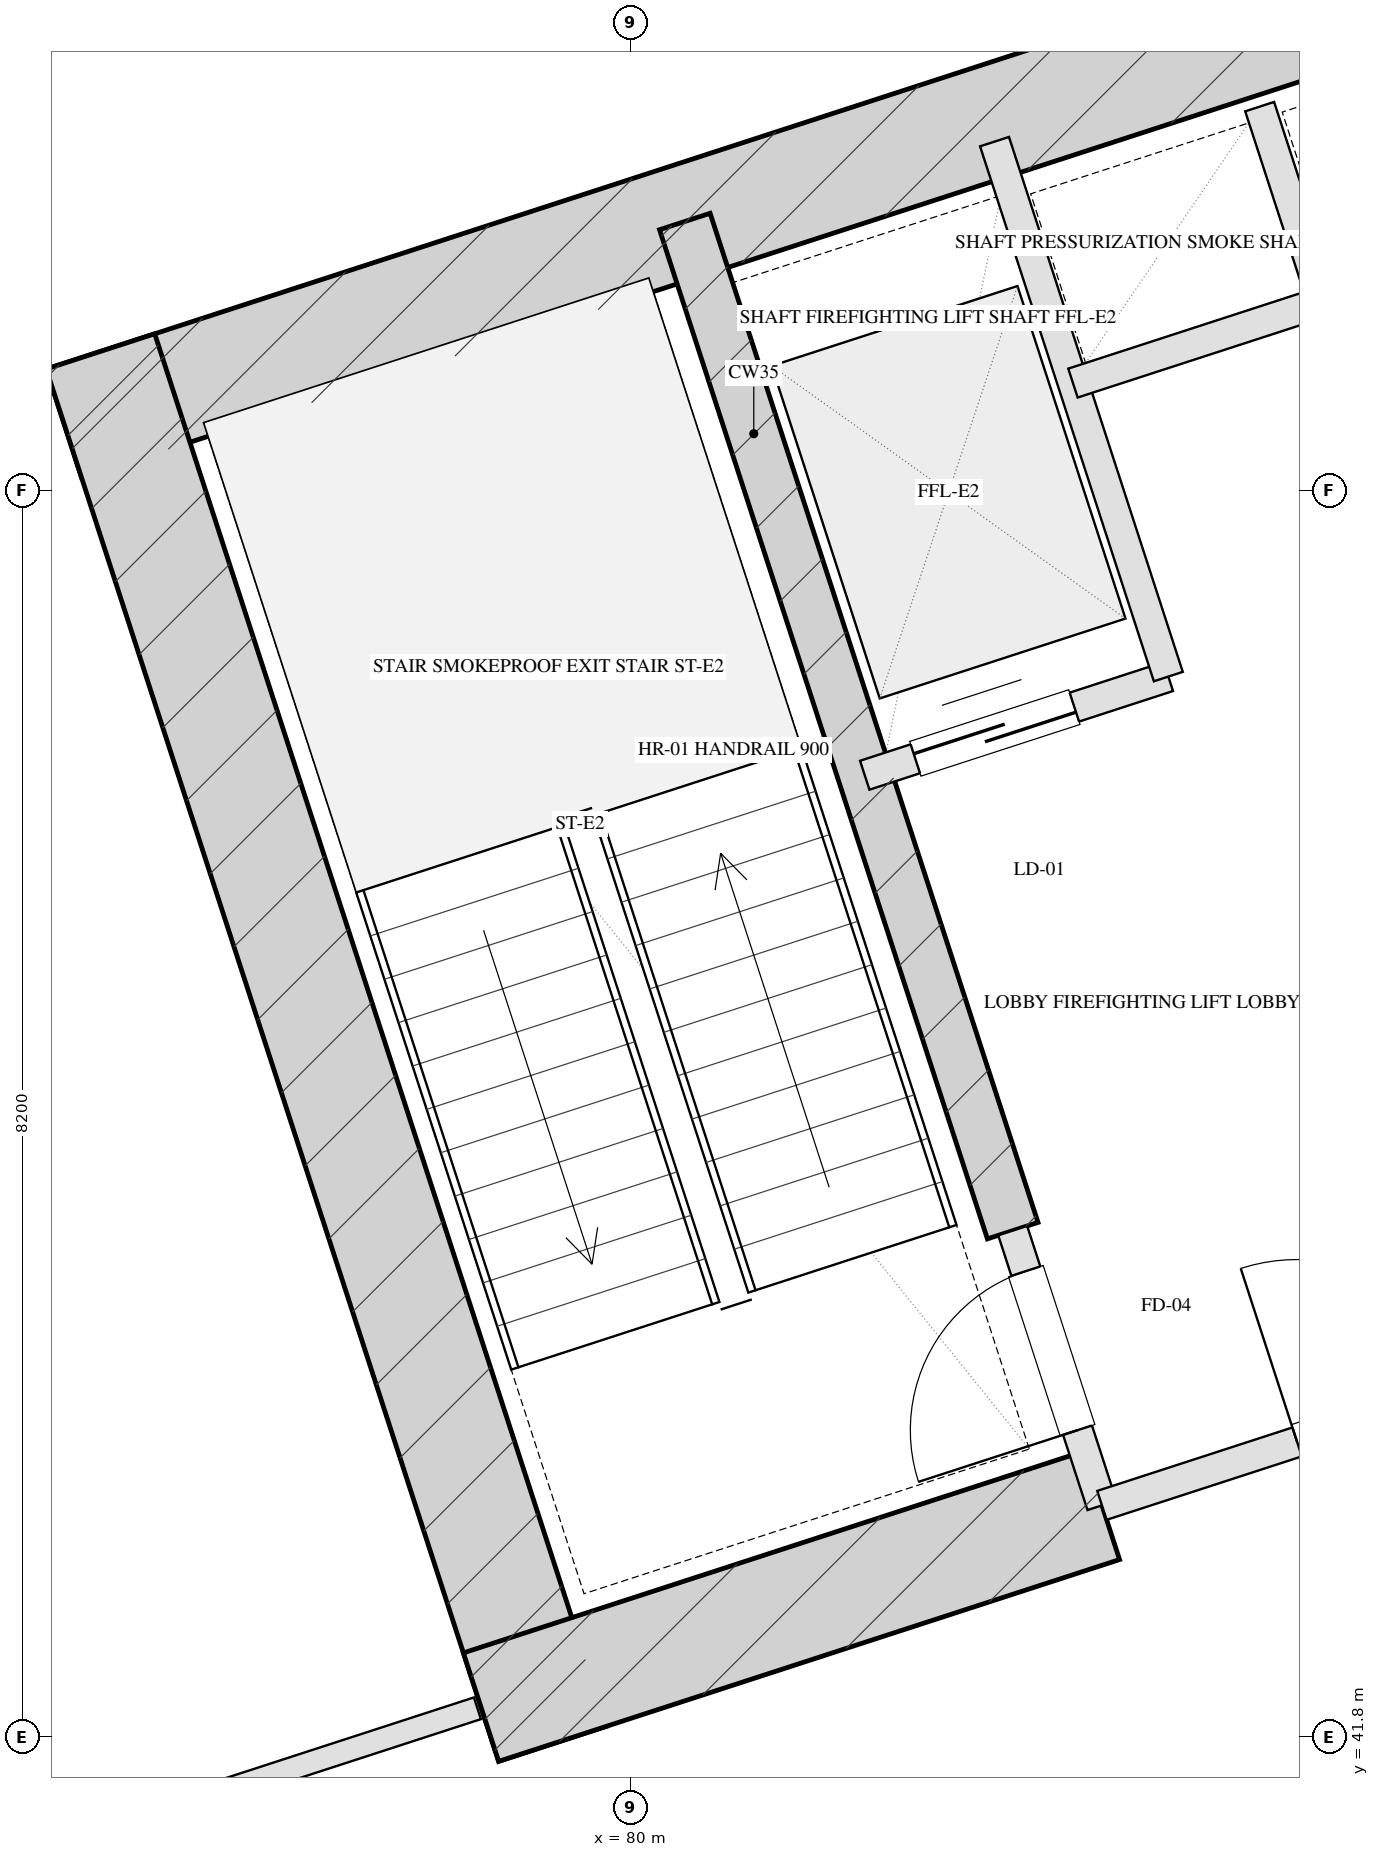
"""IFC4 building model, lengths in metres.
Left out: names, types, materials, properties, quantities, classifications, styles, units other than length and angle.
Written with IfcOpenShell. Run it as: python <this file> out.ifc"""

import sys

from ifc_helpers import new_model, si_unit, direction, frame, frame_2d, origin, place, context, subcontext, project, spatial, rectangle, extrude, element, fill, save


model = new_model("IFC4")
c1 = context("Model", 3, precision=1e-05, world=origin(), true_north=direction((0.0, 1.0)))
c2 = subcontext(c1, "Body", "Model", "MODEL_VIEW")
j1 = project(units=[si_unit("LENGTHUNIT", "METRE"), si_unit("PLANEANGLEUNIT", "RADIAN")], contexts=[c1])
p1 = place(None, origin())
s1 = spatial("IfcSite", under=j1, at=p1, CompositionType="ELEMENT")
p2 = place(p1, origin())
s2 = spatial("IfcBuilding", under=s1, at=p2, CompositionType="ELEMENT")
p3 = place(p2, frame((0.0, 0.0, 26.0)))
s3 = spatial("IfcBuildingStorey", under=s2, at=p3, CompositionType="ELEMENT", Elevation=26.0)
p4 = place(p3, frame((76.272, 50.443, 0.0), z_axis=(0.0, 0.0, 1.0), x_axis=(0.951056072937, 0.309018358888, 0.0)))
e1 = element("IfcWall", 1, at=p4, inside=s3, PredefinedType="SHEAR", context=c2, shape_type="SweptSolid", body=[
    extrude(rectangle(XDim=16.55, YDim=0.75, at=frame_2d((8.275, 0.0))), origin(), (0.0, 0.0, 1.0), 4.0),
])
p5 = place(p3, frame((79.489, 41.756, 0.0), z_axis=(0.0, 0.0, 1.0), x_axis=(-0.309016134813, 0.951056795583, 0.0)))
e2 = element("IfcWall", 2, at=p5, inside=s3, PredefinedType="SHEAR", context=c2, shape_type="SweptSolid", body=[
    extrude(rectangle(XDim=9.63, YDim=0.75, at=frame_2d((4.815, 0.0))), origin(), (0.0, 0.0, 1.0), 4.0),
])
p6 = place(p3, frame((82.514, 45.131, 0.0), z_axis=(0.0, 0.0, 1.0), x_axis=(-0.308988790936, 0.951065679686, 0.0)))
e3 = element("IfcWall", 3, at=p6, inside=s3, PredefinedType="SHEAR", context=c2, shape_type="SweptSolid", body=[
    extrude(rectangle(XDim=6.98, YDim=0.35, at=frame_2d((3.49, 0.0))), origin(), (0.0, 0.0, 1.0), 4.0),
])
p7 = place(p3, frame((79.016, 41.997, 0.0), z_axis=(0.0, 0.0, 1.0), x_axis=(0.95106038264, 0.309005094736, 0.0)))
e4 = element("IfcWall", 4, at=p7, inside=s3, PredefinedType="SHEAR", context=c2, shape_type="SweptSolid", body=[
    extrude(rectangle(XDim=4.295, YDim=0.75, at=frame_2d((2.147, 0.0))), origin(), (0.0, 0.0, 1.0), 4.0),
])
p8 = place(p3, frame((79.655, 4.352, 0.0), z_axis=(0.0, 0.0, 1.0), x_axis=(-0.309014526607, 0.951057318118, 0.0)))
e5 = element("IfcWall", 5, at=p8, inside=s3, PredefinedType="SOLIDWALL", context=c2, shape_type="SweptSolid", body=[
    extrude(rectangle(XDim=50.0, YDim=0.4, at=frame_2d((25.0, 0.0))), origin(), (0.0, 0.0, 1.0), 3.16),
])
p9 = place(p8, frame((17.35, 0.0, 0.75)))
e6 = element("IfcOpeningElement", 6, at=p9, cuts=e5, PredefinedType="OPENING", context=c2, shape_type="SweptSolid", body=[
    extrude(rectangle(XDim=2.5, YDim=1.75, at=frame_2d((1.25, 0.875))), frame((0.0, 0.21, 0.0), z_axis=(0.0, -1.0, 0.0), x_axis=(1.0, 0.0, 0.0)), (0.0, 0.0, 1.0), 0.42),
])
p10 = place(p8, frame((21.15, 0.0, 0.75)))
e7 = element("IfcOpeningElement", 7, at=p10, cuts=e5, PredefinedType="OPENING", context=c2, shape_type="SweptSolid", body=[
    extrude(rectangle(XDim=2.5, YDim=1.75, at=frame_2d((1.25, 0.875))), frame((0.0, 0.21, 0.0), z_axis=(0.0, -1.0, 0.0), x_axis=(1.0, 0.0, 0.0)), (0.0, 0.0, 1.0), 0.42),
])
p11 = place(p8, frame((26.35, 0.0, 0.75)))
e8 = element("IfcOpeningElement", 8, at=p11, cuts=e5, PredefinedType="OPENING", context=c2, shape_type="SweptSolid", body=[
    extrude(rectangle(XDim=2.5, YDim=1.75, at=frame_2d((1.25, 0.875))), frame((0.0, 0.21, 0.0), z_axis=(0.0, -1.0, 0.0), x_axis=(1.0, 0.0, 0.0)), (0.0, 0.0, 1.0), 0.42),
])
p12 = place(p8, frame((30.15, 0.0, 0.75)))
e9 = element("IfcOpeningElement", 9, at=p12, cuts=e5, PredefinedType="OPENING", context=c2, shape_type="SweptSolid", body=[
    extrude(rectangle(XDim=2.5, YDim=1.75, at=frame_2d((1.25, 0.875))), frame((0.0, 0.21, 0.0), z_axis=(0.0, -1.0, 0.0), x_axis=(1.0, 0.0, 0.0)), (0.0, 0.0, 1.0), 0.42),
])
p13 = place(p3, frame((83.101, 43.324, 0.0), z_axis=(0.0, 0.0, 1.0), x_axis=(-0.309048298632, 0.951046344356, 0.0)))
e10 = element("IfcWall", 10, at=p13, inside=s3, PredefinedType="PARTITIONING", context=c2, shape_type="SweptSolid", body=[
    extrude(rectangle(XDim=1.9, YDim=0.2, at=frame_2d((0.95, 0.0))), origin(), (0.0, 0.0, 1.0), 3.725),
])
p14 = place(p13, frame((0.52, 0.0, 0.0)))
e11 = element("IfcOpeningElement", 11, at=p14, cuts=e10, PredefinedType="OPENING", context=c2, shape_type="SweptSolid", body=[
    extrude(rectangle(XDim=1.1, YDim=2.05, at=frame_2d((0.55, 1.025))), frame((0.0, 0.11, 0.0), z_axis=(0.0, -1.0, 0.0), x_axis=(1.0, 0.0, 0.0)), (0.0, 0.0, 1.0), 0.22),
])
p15 = place(p3, frame((86.743, 44.508, 0.0), z_axis=(0.0, 0.0, 1.0), x_axis=(-0.309016001439, 0.951056838919, 0.0)))
e12 = element("IfcWall", 12, at=p15, inside=s3, PredefinedType="PARTITIONING", context=c2, shape_type="SweptSolid", body=[
    extrude(rectangle(XDim=8.43, YDim=0.2, at=frame_2d((4.215, 0.0))), origin(), (0.0, 0.0, 1.0), 3.725),
])
p16 = place(p3, frame((83.101, 43.324, 0.0), z_axis=(0.0, 0.0, 1.0), x_axis=(0.951052804469, 0.309028417967, 0.0)))
e13 = element("IfcWall", 13, at=p16, inside=s3, PredefinedType="PARTITIONING", context=c2, shape_type="SweptSolid", body=[
    extrude(rectangle(XDim=3.83, YDim=0.2, at=frame_2d((1.915, 0.0))), origin(), (0.0, 0.0, 1.0), 3.725),
])
p17 = place(p16, frame((1.35, 0.0, 0.0)))
e14 = element("IfcOpeningElement", 14, at=p17, cuts=e13, PredefinedType="OPENING", context=c2, shape_type="SweptSolid", body=[
    extrude(rectangle(XDim=1.2, YDim=2.05, at=frame_2d((0.6, 1.025))), frame((0.0, 0.11, 0.0), z_axis=(0.0, -1.0, 0.0), x_axis=(1.0, 0.0, 0.0)), (0.0, 0.0, 1.0), 0.22),
])
p18 = place(p3, frame((81.54, 48.127, 0.0), z_axis=(0.0, 0.0, 1.0), x_axis=(0.951062257173, 0.308999325213, 0.0)))
e15 = element("IfcWall", 15, at=p18, inside=s3, PredefinedType="PARTITIONING", context=c2, shape_type="SweptSolid", body=[
    extrude(rectangle(XDim=2.1, YDim=0.2, at=frame_2d((1.05, 0.0))), origin(), (0.0, 0.0, 1.0), 3.725),
])
p19 = place(p18, frame((0.35, 0.0, 0.0)))
e16 = element("IfcOpeningElement", 16, at=p19, cuts=e15, PredefinedType="OPENING", context=c2, shape_type="SweptSolid", body=[
    extrude(rectangle(XDim=1.1, YDim=2.05, at=frame_2d((0.55, 1.025))), frame((0.0, 0.11, 0.0), z_axis=(0.0, -1.0, 0.0), x_axis=(1.0, 0.0, 0.0)), (0.0, 0.0, 1.0), 0.22),
])
p20 = place(p3, frame((83.538, 48.776, 0.0), z_axis=(0.0, 0.0, 1.0), x_axis=(-0.3089935693, 0.951064127245, 0.0)))
e17 = element("IfcWall", 17, at=p20, inside=s3, PredefinedType="PARTITIONING", context=c2, shape_type="SweptSolid", body=[
    extrude(rectangle(XDim=3.7, YDim=0.2, at=frame_2d((1.85, 0.0))), origin(), (0.0, 0.0, 1.0), 3.725),
])
p21 = place(p3, frame((82.91, 50.707, 0.0), z_axis=(0.0, 0.0, 1.0), x_axis=(0.951041328149, 0.309063734775, 0.0)))
e18 = element("IfcWall", 18, at=p21, inside=s3, PredefinedType="PARTITIONING", context=c2, shape_type="SweptSolid", body=[
    extrude(rectangle(XDim=1.73, YDim=0.2, at=frame_2d((0.865, 0.0))), origin(), (0.0, 0.0, 1.0), 3.725),
])
p22 = place(p3, frame((68.721, 38.652, 0.0), z_axis=(0.0, 0.0, 1.0), x_axis=(0.951056658866, 0.309016555588, 0.0)))
e19 = element("IfcWall", 19, at=p22, inside=s3, PredefinedType="PARTITIONING", context=c2, shape_type="SweptSolid", body=[
    extrude(rectangle(XDim=10.8, YDim=0.15, at=frame_2d((5.4, 0.0))), origin(), (0.0, 0.0, 1.0), 3.725),
])
p23 = place(p22, frame((4.536, 0.0, 0.0)))
e20 = element("IfcOpeningElement", 20, at=p23, cuts=e19, PredefinedType="OPENING", context=c2, shape_type="SweptSolid", body=[
    extrude(rectangle(XDim=0.85, YDim=2.05, at=frame_2d((0.425, 1.025))), frame((0.0, 0.085, 0.0), z_axis=(0.0, -1.0, 0.0), x_axis=(1.0, 0.0, 0.0)), (0.0, 0.0, 1.0), 0.17),
])
p24 = place(p14, origin())
e21 = element("IfcDoor", 21, at=p24, inside=s3, OperationType="SINGLE_SWING_LEFT", PredefinedType="DOOR", context=c2, shape_type="SweptSolid", body=[
    extrude(rectangle(XDim=1.1, YDim=2.05, at=frame_2d((0.55, 1.025))), frame((0.0, 0.025, 0.0), z_axis=(0.0, -1.0, 0.0), x_axis=(1.0, 0.0, 0.0)), (0.0, 0.0, 1.0), 0.05),
])
fill(e11, e21)
p25 = place(p17, origin())
e22 = element("IfcDoor", 22, at=p25, inside=s3, OperationType="SINGLE_SWING_LEFT", PredefinedType="DOOR", context=c2, shape_type="SweptSolid", body=[
    extrude(rectangle(XDim=1.2, YDim=2.05, at=frame_2d((0.6, 1.025))), frame((0.0, 0.025, 0.0), z_axis=(0.0, -1.0, 0.0), x_axis=(1.0, 0.0, 0.0)), (0.0, 0.0, 1.0), 0.05),
])
fill(e14, e22)
p26 = place(p19, origin())
e23 = element("IfcDoor", 23, at=p26, inside=s3, OperationType="DOUBLE_DOOR_SLIDING", PredefinedType="DOOR", context=c2, shape_type="SweptSolid", body=[
    extrude(rectangle(XDim=1.1, YDim=2.05, at=frame_2d((0.55, 1.025))), frame((0.0, 0.025, 0.0), z_axis=(0.0, -1.0, 0.0), x_axis=(1.0, 0.0, 0.0)), (0.0, 0.0, 1.0), 0.05),
])
fill(e16, e23)
save(model, sys.argv[1])
